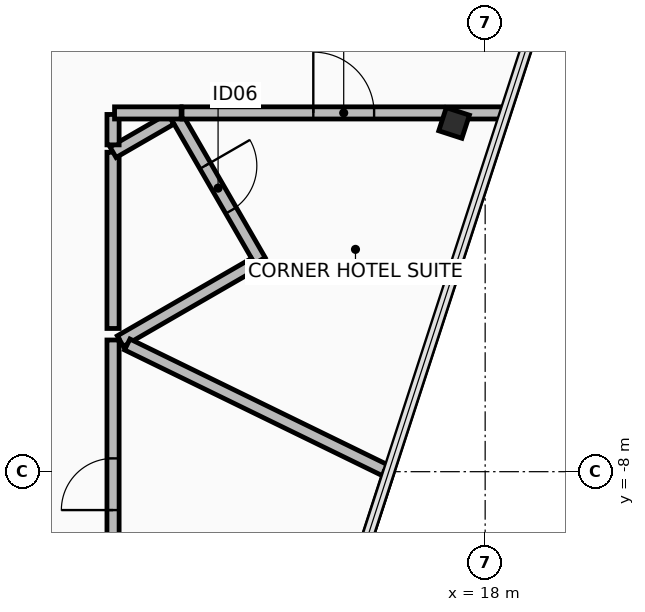
"""IFC4 building model, lengths in metres.
Left out: names, types, materials, properties, quantities, classifications, styles, units other than length and angle.
Written with IfcOpenShell. Run it as: python <this file> out.ifc"""

import sys

from ifc_helpers import new_model, si_unit, direction, frame, frame_2d, origin, origin_2d, place, context, subcontext, project, spatial, rectangle, hollow_rectangle, extrude, element, fill, save


model = new_model("IFC4")
c1 = context("Model", 3, precision=1e-05, world=origin(), true_north=direction((0.0, 1.0)))
c2 = subcontext(c1, "Body", "Model", "MODEL_VIEW")
j1 = project(units=[si_unit("LENGTHUNIT", "METRE"), si_unit("PLANEANGLEUNIT", "RADIAN")], contexts=[c1])
p1 = place(None, origin())
s1 = spatial("IfcSite", under=j1, at=p1, CompositionType="ELEMENT")
p2 = place(p1, origin())
s2 = spatial("IfcBuilding", under=s1, at=p2, CompositionType="ELEMENT")
p3 = place(p2, frame((0.0, 0.0, 287.05)))
s3 = spatial("IfcBuildingStorey", under=s2, at=p3, CompositionType="ELEMENT", Elevation=287.05)
p4 = place(p3, frame((17.489, -2.265, 0.0), z_axis=(0.0, 0.0, 1.0), x_axis=(0.309018654281, 0.951055976957, 0.0)))
e1 = element("IfcColumn", 1, at=p4, inside=s3, PredefinedType="COLUMN", context=c2, shape_type="SweptSolid", body=[
    extrude(hollow_rectangle(XDim=0.4, YDim=0.4, WallThickness=0.025, at=origin_2d()), origin(), (0.0, 0.0, 1.0), 3.65),
])
p5 = place(p3, frame((12.92, -2.146, 0.0), z_axis=(0.0, 0.0, 1.0), x_axis=(0.499996545922, -0.866027397988, 0.0)))
e2 = element("IfcWall", 2, at=p5, inside=s3, PredefinedType="PARTITIONING", context=c2, shape_type="SweptSolid", body=[
    extrude(rectangle(XDim=2.75, YDim=0.2, at=frame_2d((1.375, 0.0))), origin(), (0.0, 0.0, 1.0), 2.96),
])
p6 = place(p5, frame((0.95, 0.0, 0.0)))
e3 = element("IfcOpeningElement", 3, at=p6, cuts=e2, PredefinedType="OPENING", context=c2, shape_type="SweptSolid", body=[
    extrude(rectangle(XDim=0.85, YDim=2.1, at=frame_2d((0.425, 1.05))), frame((0.0, 0.11, 0.0), z_axis=(0.0, -1.0, 0.0), x_axis=(1.0, 0.0, 0.0)), (0.0, 0.0, 1.0), 0.22),
])
p7 = place(p3, frame((14.204, -4.58, 0.0), z_axis=(0.0, 0.0, 1.0), x_axis=(-0.866038622153, -0.499977104415, 0.0)))
e4 = element("IfcWall", 4, at=p7, inside=s3, PredefinedType="PARTITIONING", context=c2, shape_type="SweptSolid", body=[
    extrude(rectangle(XDim=2.545, YDim=0.2, at=frame_2d((1.272, 0.0))), origin(), (0.0, 0.0, 1.0), 2.96),
])
p8 = place(p3, frame((11.88, -5.645, 0.0), z_axis=(0.0, 0.0, 1.0), x_axis=(0.0, 1.0, 0.0)))
e5 = element("IfcWall", 5, at=p8, inside=s3, PredefinedType="PARTITIONING", context=c2, shape_type="SweptSolid", body=[
    extrude(rectangle(XDim=2.898, YDim=0.2, at=frame_2d((1.449, 0.0))), origin(), (0.0, 0.0, 1.0), 2.96),
])
p9 = place(p3, frame((11.88, -2.747, 0.0), z_axis=(0.0, 0.0, 1.0), x_axis=(0.86609656662, 0.499876722092, 0.0)))
e6 = element("IfcWall", 6, at=p9, inside=s3, PredefinedType="PARTITIONING", context=c2, shape_type="SweptSolid", body=[
    extrude(rectangle(XDim=1.096, YDim=0.2, at=frame_2d((0.548, 0.0))), origin(), (0.0, 0.0, 1.0), 3.465),
])
p10 = place(p3, frame((11.88, -10.579, 0.0), z_axis=(0.0, 0.0, 1.0), x_axis=(0.0, 1.0, 0.0)))
e7 = element("IfcWall", 7, at=p10, inside=s3, PredefinedType="PARTITIONING", context=c2, shape_type="SweptSolid", body=[
    extrude(rectangle(XDim=4.745, YDim=0.2, at=frame_2d((2.373, 0.0))), origin(), (0.0, 0.0, 1.0), 2.96),
])
p11 = place(p10, frame((1.948, 0.0, 0.0)))
e8 = element("IfcOpeningElement", 8, at=p11, cuts=e7, PredefinedType="OPENING", context=c2, shape_type="SweptSolid", body=[
    extrude(rectangle(XDim=0.85, YDim=2.1, at=frame_2d((0.425, 1.05))), frame((0.0, 0.11, 0.0), z_axis=(0.0, -1.0, 0.0), x_axis=(1.0, 0.0, 0.0)), (0.0, 0.0, 1.0), 0.22),
])
p12 = place(p3, frame((12.114, -5.908, 0.0), z_axis=(0.0, 0.0, 1.0), x_axis=(0.898773373644, -0.438413529476, 0.0)))
e9 = element("IfcWall", 9, at=p12, inside=s3, PredefinedType="PARTITIONING", context=c2, shape_type="SweptSolid", body=[
    extrude(rectangle(XDim=4.761, YDim=0.2, at=frame_2d((2.381, 0.0))), origin(), (0.0, 0.0, 1.0), 2.81),
])
p13 = place(p3, frame((16.406, -8.026, 0.0), z_axis=(0.0, 0.0, 1.0), x_axis=(-0.309030454155, -0.951052142842, 0.0)))
e10 = element("IfcWall", 10, at=p13, inside=s3, PredefinedType="PARTITIONING", context=c2, shape_type="SweptSolid", body=[
    extrude(rectangle(XDim=11.514, YDim=0.15, at=frame_2d((5.757, 0.0))), origin(), (0.0, 0.0, 1.0), 3.465),
])
p14 = place(p3, frame((11.88, -2.625, 0.0), z_axis=(0.0, 0.0, 1.0), x_axis=(0.0, 1.0, 0.0)))
e11 = element("IfcWall", 11, at=p14, inside=s3, PredefinedType="PARTITIONING", context=c2, shape_type="SweptSolid", body=[
    extrude(rectangle(XDim=0.5, YDim=0.2, at=frame_2d((0.25, 0.0))), origin(), (0.0, 0.0, 1.0), 3.465),
])
p15 = place(p3, frame((11.905, -2.1, 0.0), z_axis=(0.0, 0.0, 1.0), x_axis=(1.0, 0.0, 0.0)))
e12 = element("IfcWall", 12, at=p15, inside=s3, PredefinedType="PARTITIONING", context=c2, shape_type="SweptSolid", body=[
    extrude(rectangle(XDim=1.095, YDim=0.2, at=frame_2d((0.547, 0.0))), origin(), (0.0, 0.0, 1.0), 3.465),
])
p16 = place(p3, frame((13.015, -2.1, 0.0), z_axis=(0.0, 0.0, 1.0), x_axis=(1.0, 0.0, 0.0)))
e13 = element("IfcWall", 13, at=p16, inside=s3, PredefinedType="PARTITIONING", context=c2, shape_type="SweptSolid", body=[
    extrude(rectangle(XDim=5.317, YDim=0.2, at=frame_2d((2.658, 0.0))), origin(), (0.0, 0.0, 1.0), 2.81),
])
p17 = place(p16, frame((2.159, 0.0, 0.0)))
e14 = element("IfcOpeningElement", 14, at=p17, cuts=e13, PredefinedType="OPENING", context=c2, shape_type="SweptSolid", body=[
    extrude(rectangle(XDim=1.0, YDim=2.15, at=frame_2d((0.5, 1.075))), frame((0.0, 0.11, 0.0), z_axis=(0.0, -1.0, 0.0), x_axis=(1.0, 0.0, 0.0)), (0.0, 0.0, 1.0), 0.22),
])
p18 = place(p6, origin())
e15 = element("IfcDoor", 15, at=p18, inside=s3, OperationType="SINGLE_SWING_RIGHT", PredefinedType="DOOR", context=c2, shape_type="SweptSolid", body=[
    extrude(rectangle(XDim=0.85, YDim=2.1, at=frame_2d((0.425, 1.05))), frame((0.0, 0.025, 0.0), z_axis=(0.0, -1.0, 0.0), x_axis=(1.0, 0.0, 0.0)), (0.0, 0.0, 1.0), 0.05),
])
fill(e3, e15)
p19 = place(p11, origin())
e16 = element("IfcDoor", 16, at=p19, inside=s3, OperationType="SINGLE_SWING_RIGHT", PredefinedType="DOOR", context=c2, shape_type="SweptSolid", body=[
    extrude(rectangle(XDim=0.85, YDim=2.1, at=frame_2d((0.425, 1.05))), frame((0.0, 0.025, 0.0), z_axis=(0.0, -1.0, 0.0), x_axis=(1.0, 0.0, 0.0)), (0.0, 0.0, 1.0), 0.05),
])
fill(e8, e16)
p20 = place(p17, origin())
e17 = element("IfcDoor", 17, at=p20, inside=s3, OperationType="SINGLE_SWING_LEFT", PredefinedType="DOOR", context=c2, shape_type="SweptSolid", body=[
    extrude(rectangle(XDim=1.0, YDim=2.15, at=frame_2d((0.5, 1.075))), frame((0.0, 0.025, 0.0), z_axis=(0.0, -1.0, 0.0), x_axis=(1.0, 0.0, 0.0)), (0.0, 0.0, 1.0), 0.05),
])
fill(e14, e17)
save(model, sys.argv[1])
